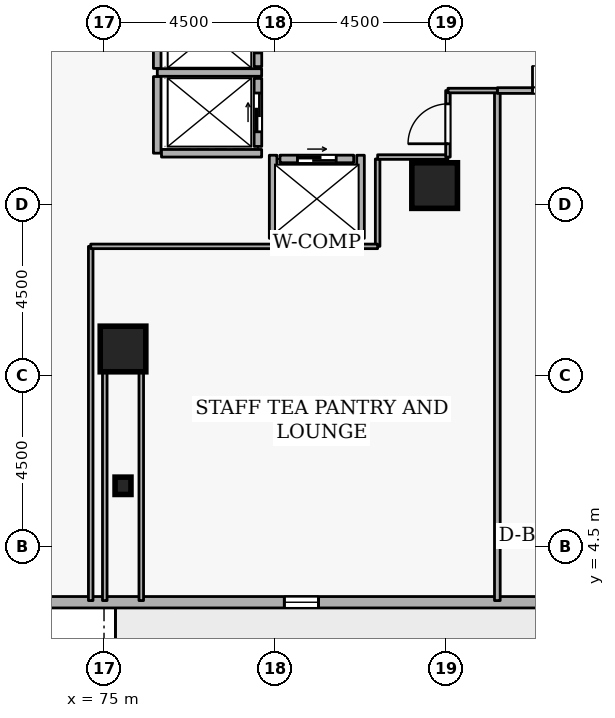
"""IFC4 building model, lengths in metres.
Left out: names, types, materials, properties, quantities, classifications, styles, units other than length and angle.
Written with IfcOpenShell. Run it as: python <this file> out.ifc"""

import sys

from ifc_helpers import new_model, si_unit, direction, frame, frame_2d, origin, origin_2d, place, context, subcontext, project, spatial, rectangle, i_section, extrude, element, fill, save


model = new_model("IFC4")
c1 = context("Model", 3, precision=1e-05, world=origin(), true_north=direction((0.0, 1.0)))
c2 = subcontext(c1, "Body", "Model", "MODEL_VIEW")
j1 = project(units=[si_unit("LENGTHUNIT", "METRE"), si_unit("PLANEANGLEUNIT", "RADIAN")], contexts=[c1])
p1 = place(None, origin())
s1 = spatial("IfcSite", under=j1, at=p1, CompositionType="ELEMENT")
p2 = place(p1, origin())
s2 = spatial("IfcBuilding", under=s1, at=p2, CompositionType="ELEMENT")
p3 = place(p2, frame((0.0, 0.0, 112.5)))
s3 = spatial("IfcBuildingStorey", under=s2, at=p3, CompositionType="ELEMENT", Elevation=112.5)
for number, where, z_axis, x_axis in (
    (1, (75.5, 9.7, 0.0), (0.0, 0.0, 1.0), (1.0, 0.0, 0.0)),
    (2, (83.7, 14.0, 0.0), (0.0, 0.0, 1.0), (1.0, 0.0, 0.0)),
):
    element("IfcColumn", number, at=place(p3, frame(where, z_axis=z_axis, x_axis=x_axis)), inside=s3, PredefinedType="COLUMN", context=c2, shape_type="SweptSolid", body=[
        extrude(rectangle(XDim=1.2, YDim=1.2, at=origin_2d()), origin(), (0.0, 0.0, 1.0), 3.6),
    ])
p4 = place(p3, frame((75.5, 6.1, 0.0), z_axis=(0.0, 0.0, 1.0), x_axis=(1.0, 0.0, 0.0)))
e3 = element("IfcColumn", 3, at=p4, inside=s3, PredefinedType="COLUMN", context=c2, shape_type="SweptSolid", body=[
    extrude(i_section(OverallWidth=0.418, OverallDepth=0.456, WebThickness=0.042, FlangeThickness=0.067, FilletRadius=0.015, at=origin_2d()), origin(), (0.0, 0.0, 1.0), 3.6),
])
p5 = place(p3, frame((67.445, 3.036, 0.0), z_axis=(0.0, 0.0, 1.0), x_axis=(0.999999999641, -2.6801568e-05, 0.0)))
e4 = element("IfcWall", 4, at=p5, inside=s3, PredefinedType="STANDARD", context=c2, shape_type="SweptSolid", body=[
    extrude(rectangle(XDim=36.437, YDim=0.3, at=frame_2d((18.218, 0.0))), origin(), (0.0, 0.0, 1.0), 2.7),
])
p6 = place(p5, frame((19.118, 0.0, 0.0)))
e5 = element("IfcOpeningElement", 5, at=p6, cuts=e4, PredefinedType="OPENING", context=c2, shape_type="SweptSolid", body=[
    extrude(rectangle(XDim=1.0, YDim=2.08, at=frame_2d((0.5, 1.04))), frame((0.0, 0.16, 0.0), z_axis=(0.0, -1.0, 0.0), x_axis=(1.0, 0.0, 0.0)), (0.0, 0.0, 1.0), 0.32),
])
p7 = place(p5, frame((2.7, 0.0, 0.72)))
e6 = element("IfcOpeningElement", 6, at=p7, cuts=e4, PredefinedType="OPENING", context=c2, shape_type="SweptSolid", body=[
    extrude(rectangle(XDim=0.9, YDim=1.75, at=frame_2d((0.45, 0.875))), frame((0.0, 0.16, 0.0), z_axis=(0.0, -1.0, 0.0), x_axis=(1.0, 0.0, 0.0)), (0.0, 0.0, 1.0), 0.32),
])
p8 = place(p5, frame((12.3, 0.0, 0.72)))
e7 = element("IfcOpeningElement", 7, at=p8, cuts=e4, PredefinedType="OPENING", context=c2, shape_type="SweptSolid", body=[
    extrude(rectangle(XDim=0.9, YDim=1.75, at=frame_2d((0.45, 0.875))), frame((0.0, 0.16, 0.0), z_axis=(0.0, -1.0, 0.0), x_axis=(1.0, 0.0, 0.0)), (0.0, 0.0, 1.0), 0.32),
])
p9 = place(p5, frame((21.9, 0.0, 0.72)))
e8 = element("IfcOpeningElement", 8, at=p9, cuts=e4, PredefinedType="OPENING", context=c2, shape_type="SweptSolid", body=[
    extrude(rectangle(XDim=0.9, YDim=1.75, at=frame_2d((0.45, 0.875))), frame((0.0, 0.16, 0.0), z_axis=(0.0, -1.0, 0.0), x_axis=(1.0, 0.0, 0.0)), (0.0, 0.0, 1.0), 0.32),
])
p10 = place(p5, frame((26.7, 0.0, 0.72)))
e9 = element("IfcOpeningElement", 9, at=p10, cuts=e4, PredefinedType="OPENING", context=c2, shape_type="SweptSolid", body=[
    extrude(rectangle(XDim=0.9, YDim=1.75, at=frame_2d((0.45, 0.875))), frame((0.0, 0.16, 0.0), z_axis=(0.0, -1.0, 0.0), x_axis=(1.0, 0.0, 0.0)), (0.0, 0.0, 1.0), 0.32),
])
p11 = place(p5, frame((31.5, 0.0, 0.72)))
e10 = element("IfcOpeningElement", 10, at=p11, cuts=e4, PredefinedType="OPENING", context=c2, shape_type="SweptSolid", body=[
    extrude(rectangle(XDim=0.9, YDim=1.75, at=frame_2d((0.45, 0.875))), frame((0.0, 0.16, 0.0), z_axis=(0.0, -1.0, 0.0), x_axis=(1.0, 0.0, 0.0)), (0.0, 0.0, 1.0), 0.32),
])
p12 = place(p3, frame((79.05, 17.13, 0.0), z_axis=(0.0, 0.0, 1.0), x_axis=(0.0, 1.0, 0.0)))
e11 = element("IfcWall", 11, at=p12, inside=s3, PredefinedType="STANDARD", context=c2, shape_type="SweptSolid", body=[
    extrude(rectangle(XDim=1.74, YDim=0.2, at=frame_2d((0.87, 0.0))), origin(), (0.0, 0.0, 1.0), 3.34),
])
p13 = place(p12, frame((0.36, 0.0, 0.0)))
e12 = element("IfcOpeningElement", 12, at=p13, cuts=e11, PredefinedType="OPENING", context=c2, shape_type="SweptSolid", body=[
    extrude(rectangle(XDim=1.02, YDim=2.06, at=frame_2d((0.51, 1.03))), frame((0.0, 0.11, 0.0), z_axis=(0.0, -1.0, 0.0), x_axis=(1.0, 0.0, 0.0)), (0.0, 0.0, 1.0), 0.22),
])
p14 = place(p3, frame((79.05, 15.03, 0.0), z_axis=(0.0, 0.0, 1.0), x_axis=(0.0, 1.0, 0.0)))
e13 = element("IfcWall", 13, at=p14, inside=s3, PredefinedType="STANDARD", context=c2, shape_type="SweptSolid", body=[
    extrude(rectangle(XDim=1.79, YDim=0.2, at=frame_2d((0.895, 0.0))), origin(), (0.0, 0.0, 1.0), 3.34),
])
p15 = place(p14, frame((0.385, 0.0, 0.0)))
e14 = element("IfcOpeningElement", 14, at=p15, cuts=e13, PredefinedType="OPENING", context=c2, shape_type="SweptSolid", body=[
    extrude(rectangle(XDim=1.02, YDim=2.06, at=frame_2d((0.51, 1.03))), frame((0.0, 0.11, 0.0), z_axis=(0.0, -1.0, 0.0), x_axis=(1.0, 0.0, 0.0)), (0.0, 0.0, 1.0), 0.22),
])
p16 = place(p3, frame((79.63, 14.7, 0.0), z_axis=(0.0, 0.0, 1.0), x_axis=(1.0, 0.0, 0.0)))
e15 = element("IfcWall", 15, at=p16, inside=s3, PredefinedType="STANDARD", context=c2, shape_type="SweptSolid", body=[
    extrude(rectangle(XDim=1.94, YDim=0.2, at=frame_2d((0.97, 0.0))), origin(), (0.0, 0.0, 1.0), 3.34),
])
p17 = place(p16, frame((0.46, 0.0, 0.0)))
e16 = element("IfcOpeningElement", 16, at=p17, cuts=e15, PredefinedType="OPENING", context=c2, shape_type="SweptSolid", body=[
    extrude(rectangle(XDim=1.02, YDim=2.06, at=frame_2d((0.51, 1.03))), frame((0.0, 0.11, 0.0), z_axis=(0.0, -1.0, 0.0), x_axis=(1.0, 0.0, 0.0)), (0.0, 0.0, 1.0), 0.22),
])
p18 = place(p3, frame((76.402, 16.975, 0.0), z_axis=(0.0, 0.0, 1.0), x_axis=(1.0, 0.0, 0.0)))
e17 = element("IfcWall", 17, at=p18, inside=s3, PredefinedType="STANDARD", context=c2, shape_type="SweptSolid", body=[
    extrude(rectangle(XDim=2.746, YDim=0.2, at=frame_2d((1.373, 0.0))), origin(), (0.0, 0.0, 1.0), 3.34),
])
p19 = place(p3, frame((76.4, 14.852, 0.0), z_axis=(0.0, 0.0, 1.0), x_axis=(0.0, 1.0, 0.0)))
e18 = element("IfcWall", 18, at=p19, inside=s3, PredefinedType="STANDARD", context=c2, shape_type="SweptSolid", body=[
    extrude(rectangle(XDim=2.016, YDim=0.2, at=frame_2d((1.008, 0.0))), origin(), (0.0, 0.0, 1.0), 3.34),
])
p20 = place(p3, frame((76.4, 17.082, 0.0), z_axis=(0.0, 0.0, 1.0), x_axis=(0.0, 1.0, 0.0)))
e19 = element("IfcWall", 19, at=p20, inside=s3, PredefinedType="STANDARD", context=c2, shape_type="SweptSolid", body=[
    extrude(rectangle(XDim=1.856, YDim=0.2, at=frame_2d((0.928, 0.0))), origin(), (0.0, 0.0, 1.0), 3.34),
])
p21 = place(p3, frame((76.512, 14.85, 0.0), z_axis=(0.0, 0.0, 1.0), x_axis=(1.0, 0.0, 0.0)))
e20 = element("IfcWall", 20, at=p21, inside=s3, PredefinedType="STANDARD", context=c2, shape_type="SweptSolid", body=[
    extrude(rectangle(XDim=2.636, YDim=0.2, at=frame_2d((1.318, 0.0))), origin(), (0.0, 0.0, 1.0), 3.34),
])
p22 = place(p3, frame((79.452, 12.5, 0.0), z_axis=(0.0, 0.0, 1.0), x_axis=(1.0, 0.0, 0.0)))
e21 = element("IfcWall", 21, at=p22, inside=s3, PredefinedType="STANDARD", context=c2, shape_type="SweptSolid", body=[
    extrude(rectangle(XDim=2.296, YDim=0.2, at=frame_2d((1.148, 0.0))), origin(), (0.0, 0.0, 1.0), 3.34),
])
for number, where, z_axis, x_axis in (
    (22, (81.75, 12.612, 0.0), (0.0, 0.0, 1.0), (0.0, 1.0, 0.0)),
    (23, (79.45, 12.612, 0.0), (0.0, 0.0, 1.0), (0.0, 1.0, 0.0)),
):
    element("IfcWall", number, at=place(p3, frame(where, z_axis=z_axis, x_axis=x_axis)), inside=s3, PredefinedType="STANDARD", context=c2, shape_type="SweptSolid", body=[
        extrude(rectangle(XDim=2.186, YDim=0.2, at=frame_2d((1.093, 0.0))), origin(), (0.0, 0.0, 1.0), 3.34),
    ])
p23 = place(p3, frame((85.35, 3.08, 0.0), z_axis=(0.0, 0.0, 1.0), x_axis=(0.0, 1.0, 0.0)))
e24 = element("IfcWall", 24, at=p23, inside=s3, PredefinedType="PARTITIONING", context=c2, shape_type="SweptSolid", body=[
    extrude(rectangle(XDim=13.42, YDim=0.15, at=frame_2d((6.71, 0.0))), origin(), (0.0, 0.0, 1.0), 3.34),
])
p24 = place(p3, frame((85.35, 16.5, 0.0), z_axis=(0.0, 0.0, 1.0), x_axis=(1.0, 0.0, 0.0)))
e25 = element("IfcWall", 25, at=p24, inside=s3, PredefinedType="PARTITIONING", context=c2, shape_type="SweptSolid", body=[
    extrude(rectangle(XDim=3.15, YDim=0.15, at=frame_2d((1.575, 0.0))), origin(), (0.0, 0.0, 1.0), 3.34),
])
p25 = place(p24, frame((0.925, 0.0, 0.0)))
e26 = element("IfcOpeningElement", 26, at=p25, cuts=e25, PredefinedType="OPENING", context=c2, shape_type="SweptSolid", body=[
    extrude(rectangle(XDim=1.3, YDim=2.12, at=frame_2d((0.65, 1.06))), frame((0.0, 0.085, 0.0), z_axis=(0.0, -1.0, 0.0), x_axis=(1.0, 0.0, 0.0)), (0.0, 0.0, 1.0), 0.17),
])
p26 = place(p3, frame((82.2, 12.4, 0.0), z_axis=(0.0, 0.0, 1.0), x_axis=(0.0, 1.0, 0.0)))
e27 = element("IfcWall", 27, at=p26, inside=s3, PredefinedType="PARTITIONING", context=c2, shape_type="SweptSolid", body=[
    extrude(rectangle(XDim=2.3, YDim=0.12, at=frame_2d((1.15, 0.0))), origin(), (0.0, 0.0, 1.0), 3.34),
])
p27 = place(p3, frame((82.2, 14.75, 0.0), z_axis=(0.0, 0.0, 1.0), x_axis=(1.0, 0.0, 0.0)))
e28 = element("IfcWall", 28, at=p27, inside=s3, PredefinedType="PARTITIONING", context=c2, shape_type="SweptSolid", body=[
    extrude(rectangle(XDim=1.85, YDim=0.12, at=frame_2d((0.925, 0.0))), origin(), (0.0, 0.0, 1.0), 3.34),
])
p28 = place(p3, frame((84.05, 14.75, 0.0), z_axis=(0.0, 0.0, 1.0), x_axis=(0.0, 1.0, 0.0)))
e29 = element("IfcWall", 29, at=p28, inside=s3, PredefinedType="PARTITIONING", context=c2, shape_type="SweptSolid", body=[
    extrude(rectangle(XDim=1.75, YDim=0.12, at=frame_2d((0.875, 0.0))), origin(), (0.0, 0.0, 1.0), 3.34),
])
p29 = place(p28, frame((0.35, 0.0, 0.0)))
e30 = element("IfcOpeningElement", 30, at=p29, cuts=e29, PredefinedType="OPENING", context=c2, shape_type="SweptSolid", body=[
    extrude(rectangle(XDim=1.05, YDim=2.1, at=frame_2d((0.525, 1.05))), frame((0.0, 0.07, 0.0), z_axis=(0.0, -1.0, 0.0), x_axis=(1.0, 0.0, 0.0)), (0.0, 0.0, 1.0), 0.14),
])
p30 = place(p3, frame((84.05, 16.5, 0.0), z_axis=(0.0, 0.0, 1.0), x_axis=(1.0, 0.0, 0.0)))
e31 = element("IfcWall", 31, at=p30, inside=s3, PredefinedType="PARTITIONING", context=c2, shape_type="SweptSolid", body=[
    extrude(rectangle(XDim=1.3, YDim=0.12, at=frame_2d((0.65, 0.0))), origin(), (0.0, 0.0, 1.0), 3.34),
])
for number, where, z_axis, x_axis in (
    (32, (75.98, 3.08, 0.0), (0.0, 0.0, 1.0), (0.0, 1.0, 0.0)),
    (33, (75.02, 9.7, 0.0), (0.0, 0.0, 1.0), (0.0, -1.0, 0.0)),
):
    element("IfcWall", number, at=place(p3, frame(where, z_axis=z_axis, x_axis=x_axis)), inside=s3, PredefinedType="PARTITIONING", context=c2, shape_type="SweptSolid", body=[
        extrude(rectangle(XDim=6.62, YDim=0.12, at=frame_2d((3.31, 0.0))), origin(), (0.0, 0.0, 1.0), 3.34),
    ])
p31 = place(p3, frame((74.65, 3.08, 0.0), z_axis=(0.0, 0.0, 1.0), x_axis=(0.0, 1.0, 0.0)))
e34 = element("IfcWall", 34, at=p31, inside=s3, PredefinedType="PARTITIONING", context=c2, shape_type="SweptSolid", body=[
    extrude(rectangle(XDim=9.32, YDim=0.12, at=frame_2d((4.66, 0.0))), origin(), (0.0, 0.0, 1.0), 3.34),
])
p32 = place(p3, frame((74.65, 12.4, 0.0), z_axis=(0.0, 0.0, 1.0), x_axis=(1.0, 0.0, 0.0)))
e35 = element("IfcWall", 35, at=p32, inside=s3, PredefinedType="PARTITIONING", context=c2, shape_type="SweptSolid", body=[
    extrude(rectangle(XDim=4.802, YDim=0.12, at=frame_2d((2.401, 0.0))), origin(), (0.0, 0.0, 1.0), 3.34),
])
p33 = place(p3, frame((81.748, 12.4, 0.0), z_axis=(0.0, 0.0, 1.0), x_axis=(1.0, 0.0, 0.0)))
e36 = element("IfcWall", 36, at=p33, inside=s3, PredefinedType="PARTITIONING", context=c2, shape_type="SweptSolid", body=[
    extrude(rectangle(XDim=0.452, YDim=0.12, at=frame_2d((0.226, 0.0))), origin(), (0.0, 0.0, 1.0), 3.34),
])
p34 = place(p8, origin())
e37 = element("IfcWindow", 37, at=p34, inside=s3, PartitioningType="SINGLE_PANEL", PredefinedType="WINDOW", context=c2, shape_type="SweptSolid", body=[
    extrude(rectangle(XDim=0.9, YDim=1.75, at=frame_2d((0.45, 0.875))), frame((0.0, 0.03, 0.0), z_axis=(0.0, -1.0, 0.0), x_axis=(1.0, 0.0, 0.0)), (0.0, 0.0, 1.0), 0.06),
])
fill(e7, e37)
p35 = place(p13, origin())
e38 = element("IfcDoor", 38, at=p35, inside=s3, OperationType="SLIDING_TO_LEFT", PredefinedType="DOOR", context=c2, shape_type="SweptSolid", body=[
    extrude(rectangle(XDim=1.02, YDim=2.06, at=frame_2d((0.51, 1.03))), frame((0.0, 0.025, 0.0), z_axis=(0.0, -1.0, 0.0), x_axis=(1.0, 0.0, 0.0)), (0.0, 0.0, 1.0), 0.05),
])
fill(e12, e38)
p36 = place(p15, origin())
e39 = element("IfcDoor", 39, at=p36, inside=s3, OperationType="SLIDING_TO_LEFT", PredefinedType="DOOR", context=c2, shape_type="SweptSolid", body=[
    extrude(rectangle(XDim=1.02, YDim=2.06, at=frame_2d((0.51, 1.03))), frame((0.0, 0.025, 0.0), z_axis=(0.0, -1.0, 0.0), x_axis=(1.0, 0.0, 0.0)), (0.0, 0.0, 1.0), 0.05),
])
fill(e14, e39)
p37 = place(p17, origin())
e40 = element("IfcDoor", 40, at=p37, inside=s3, OperationType="SLIDING_TO_LEFT", PredefinedType="DOOR", context=c2, shape_type="SweptSolid", body=[
    extrude(rectangle(XDim=1.02, YDim=2.06, at=frame_2d((0.51, 1.03))), frame((0.0, 0.025, 0.0), z_axis=(0.0, -1.0, 0.0), x_axis=(1.0, 0.0, 0.0)), (0.0, 0.0, 1.0), 0.05),
])
fill(e16, e40)
p38 = place(p25, origin())
e41 = element("IfcDoor", 41, at=p38, inside=s3, OperationType="DOUBLE_DOOR_SINGLE_SWING", PredefinedType="DOOR", context=c2, shape_type="SweptSolid", body=[
    extrude(rectangle(XDim=1.3, YDim=2.12, at=frame_2d((0.65, 1.06))), frame((0.0, 0.025, 0.0), z_axis=(0.0, -1.0, 0.0), x_axis=(1.0, 0.0, 0.0)), (0.0, 0.0, 1.0), 0.05),
])
fill(e26, e41)
p39 = place(p29, origin())
e42 = element("IfcDoor", 42, at=p39, inside=s3, OperationType="SINGLE_SWING_LEFT", PredefinedType="DOOR", context=c2, shape_type="SweptSolid", body=[
    extrude(rectangle(XDim=1.05, YDim=2.1, at=frame_2d((0.525, 1.05))), frame((0.0, 0.025, 0.0), z_axis=(0.0, -1.0, 0.0), x_axis=(1.0, 0.0, 0.0)), (0.0, 0.0, 1.0), 0.05),
])
fill(e30, e42)
save(model, sys.argv[1])
